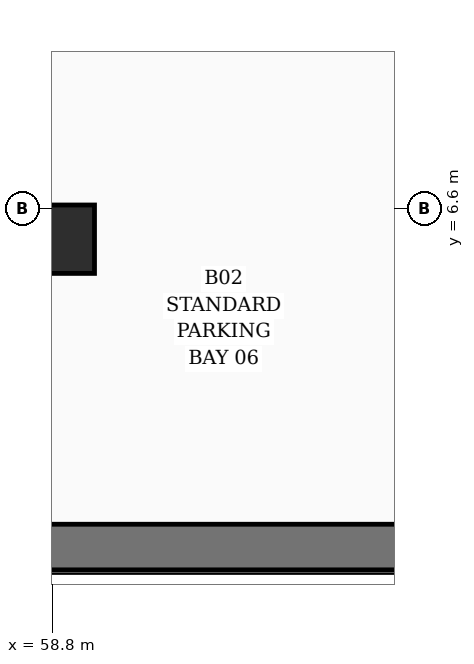
"""IFC4 building model, lengths in metres.
Left out: names, types, materials, properties, quantities, classifications, styles, units other than length and angle.
Written with IfcOpenShell. Run it as: python <this file> out.ifc"""

import sys

from ifc_helpers import new_model, si_unit, direction, frame, frame_2d, origin, origin_2d, place, context, subcontext, project, spatial, rectangle, extrude, element, save


model = new_model("IFC4")
c1 = context("Model", 3, precision=1e-05, world=origin(), true_north=direction((0.0, 1.0)))
c2 = subcontext(c1, "Body", "Model", "MODEL_VIEW")
j1 = project(units=[si_unit("LENGTHUNIT", "METRE"), si_unit("PLANEANGLEUNIT", "RADIAN")], contexts=[c1])
p1 = place(None, origin())
s1 = spatial("IfcSite", under=j1, at=p1, CompositionType="ELEMENT")
p2 = place(p1, origin())
s2 = spatial("IfcBuilding", under=s1, at=p2, CompositionType="ELEMENT")
p3 = place(p2, frame((0.0, 0.0, -9.0)))
s3 = spatial("IfcBuildingStorey", under=s2, at=p3, CompositionType="ELEMENT", Elevation=-9.0)
p4 = place(p3, frame((54.475, 2.15, 0.0), z_axis=(0.0, 0.0, 1.0), x_axis=(1.0, 0.0, 0.0)))
e1 = element("IfcWall", 1, at=p4, inside=s3, PredefinedType="USERDEFINED", context=c2, shape_type="SweptSolid", body=[
    extrude(rectangle(XDim=9.173, YDim=0.6, at=frame_2d((4.586, 0.0))), origin(), (0.0, 0.0, 1.0), 4.5),
])
p5 = place(p3, frame((58.9, 6.2, 0.0), z_axis=(0.0, 0.0, 1.0), x_axis=(1.0, 0.0, 0.0)))
e2 = element("IfcColumn", 2, at=p5, inside=s3, PredefinedType="COLUMN", context=c2, shape_type="SweptSolid", body=[
    extrude(rectangle(XDim=0.9, YDim=0.9, at=origin_2d()), origin(), (0.0, 0.0, 1.0), 4.5),
])
save(model, sys.argv[1])
